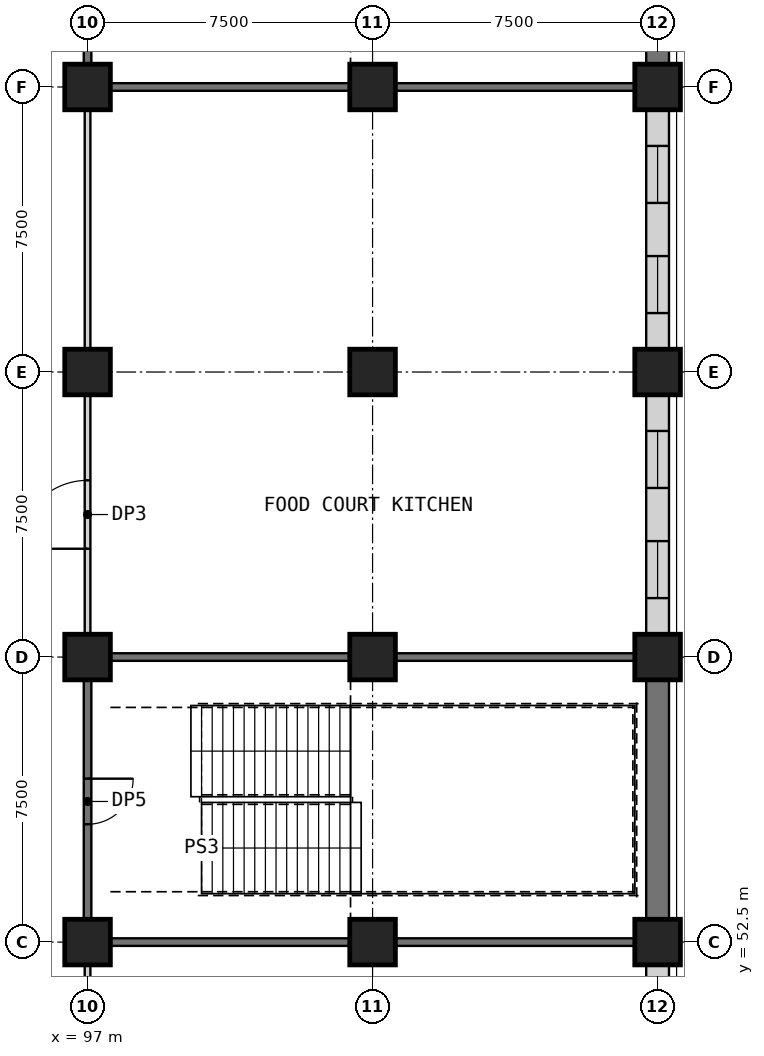
"""IFC4 building model, lengths in metres.
Left out: names, types, materials, properties, quantities, classifications, styles, units other than length and angle.
Written with IfcOpenShell. Run it as: python <this file> out.ifc"""

import sys

from ifc_helpers import new_model, si_unit, direction, frame, frame_2d, origin, origin_2d, place, context, subcontext, project, spatial, rectangle, extrude, element, fill, save


model = new_model("IFC4")
c1 = context("Model", 3, precision=1e-05, world=origin(), true_north=direction((0.0, 1.0)))
c2 = subcontext(c1, "Body", "Model", "MODEL_VIEW")
j1 = project(units=[si_unit("LENGTHUNIT", "METRE"), si_unit("PLANEANGLEUNIT", "RADIAN")], contexts=[c1])
p1 = place(None, origin())
s1 = spatial("IfcSite", under=j1, at=p1, CompositionType="ELEMENT")
p2 = place(p1, origin())
s2 = spatial("IfcBuilding", under=s1, at=p2, CompositionType="ELEMENT")
p3 = place(p2, frame((0.0, 0.0, 18.5)))
s3 = spatial("IfcBuildingStorey", under=s2, at=p3, CompositionType="ELEMENT", Elevation=18.5)
for number, where, z_axis, x_axis in (
    (1, (97.0, 52.5, 0.0), (0.0, 0.0, 1.0), (1.0, 0.0, 0.0)),
    (2, (97.0, 60.0, 0.0), (0.0, 0.0, 1.0), (1.0, 0.0, 0.0)),
    (3, (97.0, 67.5, 0.0), (0.0, 0.0, 1.0), (1.0, 0.0, 0.0)),
    (4, (97.0, 75.0, 0.0), (0.0, 0.0, 1.0), (1.0, 0.0, 0.0)),
    (5, (104.5, 52.5, 0.0), (0.0, 0.0, 1.0), (1.0, 0.0, 0.0)),
    (6, (104.5, 60.0, 0.0), (0.0, 0.0, 1.0), (1.0, 0.0, 0.0)),
    (7, (104.5, 67.5, 0.0), (0.0, 0.0, 1.0), (1.0, 0.0, 0.0)),
    (8, (104.5, 75.0, 0.0), (0.0, 0.0, 1.0), (1.0, 0.0, 0.0)),
    (9, (112.0, 52.5, 0.0), (0.0, 0.0, 1.0), (1.0, 0.0, 0.0)),
    (10, (112.0, 60.0, 0.0), (0.0, 0.0, 1.0), (1.0, 0.0, 0.0)),
    (11, (112.0, 67.5, 0.0), (0.0, 0.0, 1.0), (1.0, 0.0, 0.0)),
    (12, (112.0, 75.0, 0.0), (0.0, 0.0, 1.0), (1.0, 0.0, 0.0)),
):
    element("IfcColumn", number, at=place(p3, frame(where, z_axis=z_axis, x_axis=x_axis)), inside=s3, PredefinedType="COLUMN", context=c2, shape_type="SweptSolid", body=[
        extrude(rectangle(XDim=1.2, YDim=1.2, at=origin_2d()), origin(), (0.0, 0.0, 1.0), 5.0),
    ])
for number, where, z_axis, x_axis in (
    (13, (97.6, 52.5, 0.0), (0.0, 0.0, 1.0), (1.0, 0.0, 0.0)),
    (14, (105.1, 52.5, 0.0), (0.0, 0.0, 1.0), (1.0, 0.0, 0.0)),
    (15, (97.6, 60.0, 0.0), (0.0, 0.0, 1.0), (1.0, 0.0, 0.0)),
    (16, (105.1, 60.0, 0.0), (0.0, 0.0, 1.0), (1.0, 0.0, 0.0)),
    (17, (97.6, 75.0, 0.0), (0.0, 0.0, 1.0), (1.0, 0.0, 0.0)),
    (18, (105.1, 75.0, 0.0), (0.0, 0.0, 1.0), (1.0, 0.0, 0.0)),
):
    element("IfcWall", number, at=place(p3, frame(where, z_axis=z_axis, x_axis=x_axis)), inside=s3, PredefinedType="SHEAR", context=c2, shape_type="SweptSolid", body=[
        extrude(rectangle(XDim=6.3, YDim=0.2, at=frame_2d((3.15, 0.0))), origin(), (0.0, 0.0, 1.0), 4.7),
    ])
p4 = place(p3, frame((97.0, 46.1, 0.0), z_axis=(0.0, 0.0, 1.0), x_axis=(0.0, 1.0, 0.0)))
e19 = element("IfcWall", 19, at=p4, inside=s3, PredefinedType="PARTITIONING", context=c2, shape_type="SweptSolid", body=[
    extrude(rectangle(XDim=5.8, YDim=0.15, at=frame_2d((2.9, 0.0))), origin(), (0.0, 0.0, 1.0), 4.7),
])
p5 = place(p4, frame((2.5, 0.0, 0.0)))
e20 = element("IfcOpeningElement", 20, at=p5, cuts=e19, PredefinedType="OPENING", context=c2, shape_type="SweptSolid", body=[
    extrude(rectangle(XDim=1.0, YDim=2.1, at=frame_2d((0.5, 1.05))), frame((0.0, 0.085, 0.0), z_axis=(0.0, -1.0, 0.0), x_axis=(1.0, 0.0, 0.0)), (0.0, 0.0, 1.0), 0.17),
])
p6 = place(p3, frame((97.0, 59.4, 0.0), z_axis=(0.0, 0.0, 1.0), x_axis=(0.0, -1.0, 0.0)))
e21 = element("IfcWall", 21, at=p6, inside=s3, PredefinedType="SHEAR", context=c2, shape_type="SweptSolid", body=[
    extrude(rectangle(XDim=6.3, YDim=0.2, at=frame_2d((3.15, 0.0))), origin(), (0.0, 0.0, 1.0), 4.7),
])
p7 = place(p6, frame((2.6, 0.0, 0.0)))
e22 = element("IfcOpeningElement", 22, at=p7, cuts=e21, PredefinedType="OPENING", context=c2, shape_type="SweptSolid", body=[
    extrude(rectangle(XDim=1.2, YDim=2.1, at=frame_2d((0.6, 1.05))), frame((0.0, 0.11, 0.0), z_axis=(0.0, -1.0, 0.0), x_axis=(1.0, 0.0, 0.0)), (0.0, 0.0, 1.0), 0.22),
])
p8 = place(p3, frame((97.0, 60.6, 0.0), z_axis=(0.0, 0.0, 1.0), x_axis=(0.0, 1.0, 0.0)))
e23 = element("IfcWall", 23, at=p8, inside=s3, PredefinedType="PARTITIONING", context=c2, shape_type="SweptSolid", body=[
    extrude(rectangle(XDim=6.3, YDim=0.15, at=frame_2d((3.15, 0.0))), origin(), (0.0, 0.0, 1.0), 4.7),
])
p9 = place(p8, frame((2.25, 0.0, 0.0)))
e24 = element("IfcOpeningElement", 24, at=p9, cuts=e23, PredefinedType="OPENING", context=c2, shape_type="SweptSolid", body=[
    extrude(rectangle(XDim=1.8, YDim=2.4, at=frame_2d((0.9, 1.2))), frame((0.0, 0.085, 0.0), z_axis=(0.0, -1.0, 0.0), x_axis=(1.0, 0.0, 0.0)), (0.0, 0.0, 1.0), 0.17),
])
p10 = place(p3, frame((97.0, 68.1, 0.0), z_axis=(0.0, 0.0, 1.0), x_axis=(0.0, 1.0, 0.0)))
e25 = element("IfcWall", 25, at=p10, inside=s3, PredefinedType="PARTITIONING", context=c2, shape_type="SweptSolid", body=[
    extrude(rectangle(XDim=6.3, YDim=0.15, at=frame_2d((3.15, 0.0))), origin(), (0.0, 0.0, 1.0), 4.7),
])
p11 = place(p3, frame((97.0, 81.9, 0.0), z_axis=(0.0, 0.0, 1.0), x_axis=(0.0, -1.0, 0.0)))
e26 = element("IfcWall", 26, at=p11, inside=s3, PredefinedType="SHEAR", context=c2, shape_type="SweptSolid", body=[
    extrude(rectangle(XDim=6.3, YDim=0.2, at=frame_2d((3.15, 0.0))), origin(), (0.0, 0.0, 1.0), 4.7),
])
p12 = place(p11, frame((2.6, 0.0, 0.0)))
e27 = element("IfcOpeningElement", 27, at=p12, cuts=e26, PredefinedType="OPENING", context=c2, shape_type="SweptSolid", body=[
    extrude(rectangle(XDim=1.2, YDim=2.1, at=frame_2d((0.6, 1.05))), frame((0.0, 0.11, 0.0), z_axis=(0.0, -1.0, 0.0), x_axis=(1.0, 0.0, 0.0)), (0.0, 0.0, 1.0), 0.22),
])
p13 = place(p3, frame((112.0, 46.1, 0.0), z_axis=(0.0, 0.0, 1.0), x_axis=(0.0, 1.0, 0.0)))
e28 = element("IfcWall", 28, at=p13, inside=s3, PredefinedType="PARTITIONING", context=c2, shape_type="SweptSolid", body=[
    extrude(rectangle(XDim=5.8, YDim=0.6, at=frame_2d((2.9, 0.0))), origin(), (0.0, 0.0, 1.0), 4.1),
])
p14 = place(p13, frame((0.816, 0.0, 0.9)))
e29 = element("IfcOpeningElement", 29, at=p14, cuts=e28, PredefinedType="OPENING", context=c2, shape_type="SweptSolid", body=[
    extrude(rectangle(XDim=1.5, YDim=2.8, at=frame_2d((0.75, 1.4))), frame((0.0, 0.31, 0.0), z_axis=(0.0, -1.0, 0.0), x_axis=(1.0, 0.0, 0.0)), (0.0, 0.0, 1.0), 0.62),
])
p15 = place(p13, frame((3.484, 0.0, 0.9)))
e30 = element("IfcOpeningElement", 30, at=p15, cuts=e28, PredefinedType="OPENING", context=c2, shape_type="SweptSolid", body=[
    extrude(rectangle(XDim=1.5, YDim=2.8, at=frame_2d((0.75, 1.4))), frame((0.0, 0.31, 0.0), z_axis=(0.0, -1.0, 0.0), x_axis=(1.0, 0.0, 0.0)), (0.0, 0.0, 1.0), 0.62),
])
p16 = place(p3, frame((112.0, 53.1, 0.0), z_axis=(0.0, 0.0, 1.0), x_axis=(0.0, 1.0, 0.0)))
e31 = element("IfcWall", 31, at=p16, inside=s3, PredefinedType="PARTITIONING", context=c2, shape_type="SweptSolid", body=[
    extrude(rectangle(XDim=6.3, YDim=0.6, at=frame_2d((3.15, 0.0))), origin(), (0.0, 0.0, 1.0), 4.1),
])
p17 = place(p3, frame((112.0, 60.6, 0.0), z_axis=(0.0, 0.0, 1.0), x_axis=(0.0, 1.0, 0.0)))
e32 = element("IfcWall", 32, at=p17, inside=s3, PredefinedType="PARTITIONING", context=c2, shape_type="SweptSolid", body=[
    extrude(rectangle(XDim=6.3, YDim=0.6, at=frame_2d((3.15, 0.0))), origin(), (0.0, 0.0, 1.0), 4.1),
])
p18 = place(p17, frame((0.951, 0.0, 0.9)))
e33 = element("IfcOpeningElement", 33, at=p18, cuts=e32, PredefinedType="OPENING", context=c2, shape_type="SweptSolid", body=[
    extrude(rectangle(XDim=1.5, YDim=2.8, at=frame_2d((0.75, 1.4))), frame((0.0, 0.31, 0.0), z_axis=(0.0, -1.0, 0.0), x_axis=(1.0, 0.0, 0.0)), (0.0, 0.0, 1.0), 0.62),
])
p19 = place(p17, frame((3.849, 0.0, 0.9)))
e34 = element("IfcOpeningElement", 34, at=p19, cuts=e32, PredefinedType="OPENING", context=c2, shape_type="SweptSolid", body=[
    extrude(rectangle(XDim=1.5, YDim=2.8, at=frame_2d((0.75, 1.4))), frame((0.0, 0.31, 0.0), z_axis=(0.0, -1.0, 0.0), x_axis=(1.0, 0.0, 0.0)), (0.0, 0.0, 1.0), 0.62),
])
p20 = place(p3, frame((112.0, 68.1, 0.0), z_axis=(0.0, 0.0, 1.0), x_axis=(0.0, 1.0, 0.0)))
e35 = element("IfcWall", 35, at=p20, inside=s3, PredefinedType="PARTITIONING", context=c2, shape_type="SweptSolid", body=[
    extrude(rectangle(XDim=6.3, YDim=0.6, at=frame_2d((3.15, 0.0))), origin(), (0.0, 0.0, 1.0), 4.1),
])
p21 = place(p20, frame((0.951, 0.0, 0.9)))
e36 = element("IfcOpeningElement", 36, at=p21, cuts=e35, PredefinedType="OPENING", context=c2, shape_type="SweptSolid", body=[
    extrude(rectangle(XDim=1.5, YDim=2.8, at=frame_2d((0.75, 1.4))), frame((0.0, 0.31, 0.0), z_axis=(0.0, -1.0, 0.0), x_axis=(1.0, 0.0, 0.0)), (0.0, 0.0, 1.0), 0.62),
])
p22 = place(p20, frame((3.849, 0.0, 0.9)))
e37 = element("IfcOpeningElement", 37, at=p22, cuts=e35, PredefinedType="OPENING", context=c2, shape_type="SweptSolid", body=[
    extrude(rectangle(XDim=1.5, YDim=2.8, at=frame_2d((0.75, 1.4))), frame((0.0, 0.31, 0.0), z_axis=(0.0, -1.0, 0.0), x_axis=(1.0, 0.0, 0.0)), (0.0, 0.0, 1.0), 0.62),
])
p23 = place(p3, frame((112.0, 75.6, 0.0), z_axis=(0.0, 0.0, 1.0), x_axis=(0.0, 1.0, 0.0)))
e38 = element("IfcWall", 38, at=p23, inside=s3, PredefinedType="PARTITIONING", context=c2, shape_type="SweptSolid", body=[
    extrude(rectangle(XDim=6.3, YDim=0.6, at=frame_2d((3.15, 0.0))), origin(), (0.0, 0.0, 1.0), 4.1),
])
p24 = place(p7, origin())
e39 = element("IfcDoor", 39, at=p24, inside=s3, OperationType="SINGLE_SWING_LEFT", PredefinedType="DOOR", context=c2, shape_type="SweptSolid", body=[
    extrude(rectangle(XDim=1.2, YDim=2.1, at=frame_2d((0.6, 1.05))), frame((0.0, 0.025, 0.0), z_axis=(0.0, -1.0, 0.0), x_axis=(1.0, 0.0, 0.0)), (0.0, 0.0, 1.0), 0.05),
])
fill(e22, e39)
p25 = place(p9, origin())
e40 = element("IfcDoor", 40, at=p25, inside=s3, OperationType="SINGLE_SWING_LEFT", PredefinedType="DOOR", context=c2, shape_type="SweptSolid", body=[
    extrude(rectangle(XDim=1.8, YDim=2.4, at=frame_2d((0.9, 1.2))), frame((0.0, 0.025, 0.0), z_axis=(0.0, -1.0, 0.0), x_axis=(1.0, 0.0, 0.0)), (0.0, 0.0, 1.0), 0.05),
])
fill(e24, e40)
p26 = place(p18, origin())
e41 = element("IfcWindow", 41, at=p26, inside=s3, PartitioningType="SINGLE_PANEL", PredefinedType="WINDOW", context=c2, shape_type="SweptSolid", body=[
    extrude(rectangle(XDim=1.5, YDim=2.8, at=frame_2d((0.75, 1.4))), frame((0.0, 0.03, 0.0), z_axis=(0.0, -1.0, 0.0), x_axis=(1.0, 0.0, 0.0)), (0.0, 0.0, 1.0), 0.06),
])
fill(e33, e41)
p27 = place(p19, origin())
e42 = element("IfcWindow", 42, at=p27, inside=s3, PartitioningType="SINGLE_PANEL", PredefinedType="WINDOW", context=c2, shape_type="SweptSolid", body=[
    extrude(rectangle(XDim=1.5, YDim=2.8, at=frame_2d((0.75, 1.4))), frame((0.0, 0.03, 0.0), z_axis=(0.0, -1.0, 0.0), x_axis=(1.0, 0.0, 0.0)), (0.0, 0.0, 1.0), 0.06),
])
fill(e34, e42)
p28 = place(p21, origin())
e43 = element("IfcWindow", 43, at=p28, inside=s3, PartitioningType="SINGLE_PANEL", PredefinedType="WINDOW", context=c2, shape_type="SweptSolid", body=[
    extrude(rectangle(XDim=1.5, YDim=2.8, at=frame_2d((0.75, 1.4))), frame((0.0, 0.03, 0.0), z_axis=(0.0, -1.0, 0.0), x_axis=(1.0, 0.0, 0.0)), (0.0, 0.0, 1.0), 0.06),
])
fill(e36, e43)
p29 = place(p22, origin())
e44 = element("IfcWindow", 44, at=p29, inside=s3, PartitioningType="SINGLE_PANEL", PredefinedType="WINDOW", context=c2, shape_type="SweptSolid", body=[
    extrude(rectangle(XDim=1.5, YDim=2.8, at=frame_2d((0.75, 1.4))), frame((0.0, 0.03, 0.0), z_axis=(0.0, -1.0, 0.0), x_axis=(1.0, 0.0, 0.0)), (0.0, 0.0, 1.0), 0.06),
])
fill(e37, e44)
save(model, sys.argv[1])
